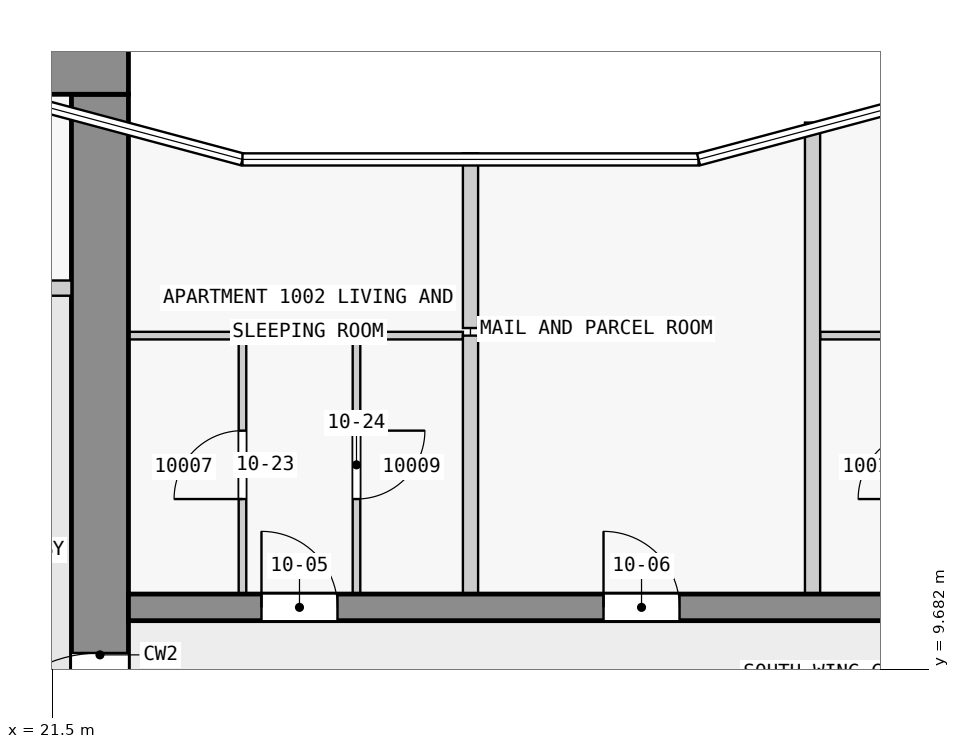
"""IFC4 building model, lengths in metres.
Left out: names, types, materials, properties, quantities, classifications, styles, units other than length and angle.
Written with IfcOpenShell. Run it as: python <this file> out.ifc"""

import sys

from ifc_helpers import new_model, si_unit, direction, frame, frame_2d, origin, place, context, subcontext, project, spatial, rectangle, extrude, element, fill, save


model = new_model("IFC4")
c1 = context("Model", 3, precision=1e-05, world=origin(), true_north=direction((0.0, 1.0)))
c2 = subcontext(c1, "Body", "Model", "MODEL_VIEW")
j1 = project(units=[si_unit("LENGTHUNIT", "METRE"), si_unit("PLANEANGLEUNIT", "RADIAN")], contexts=[c1])
p1 = place(None, origin())
s1 = spatial("IfcSite", under=j1, at=p1, CompositionType="ELEMENT")
p2 = place(p1, origin())
s2 = spatial("IfcBuilding", under=s1, at=p2, CompositionType="ELEMENT")
p3 = place(p2, frame((0.0, 0.0, 44.3)))
s3 = spatial("IfcBuildingStorey", under=s2, at=p3, CompositionType="ELEMENT", Elevation=44.3)
p4 = place(p3, frame((1.55, 17.625, 0.0), z_axis=(0.0, 0.0, 1.0), x_axis=(1.0, 0.0, 0.0)))
e1 = element("IfcWall", 1, at=p4, inside=s3, PredefinedType="SHEAR", context=c2, shape_type="SweptSolid", body=[
    extrude(rectangle(XDim=20.95, YDim=0.75, at=frame_2d((10.475, 0.0))), origin(), (0.0, 0.0, 1.0), 3.25),
])
p5 = place(p4, frame((6.55, 0.0, 0.0)))
e2 = element("IfcOpeningElement", 2, at=p5, cuts=e1, PredefinedType="OPENING", context=c2, shape_type="SweptSolid", body=[
    extrude(rectangle(XDim=1.8, YDim=2.1, at=frame_2d((0.9, 1.05))), frame((0.0, 0.385, 0.0), z_axis=(0.0, -1.0, 0.0), x_axis=(1.0, 0.0, 0.0)), (0.0, 0.0, 1.0), 0.77),
])
p6 = place(p3, frame((22.125, 2.5, 0.0), z_axis=(0.0, 0.0, 1.0), x_axis=(0.0, 1.0, 0.0)))
e3 = element("IfcWall", 3, at=p6, inside=s3, PredefinedType="SHEAR", context=c2, shape_type="SweptSolid", body=[
    extrude(rectangle(XDim=14.75, YDim=0.75, at=frame_2d((7.375, 0.0))), origin(), (0.0, 0.0, 1.0), 3.25),
])
p7 = place(p6, frame((5.6, 0.0, 0.0)))
e4 = element("IfcOpeningElement", 4, at=p7, cuts=e3, PredefinedType="OPENING", context=c2, shape_type="SweptSolid", body=[
    extrude(rectangle(XDim=1.8, YDim=2.1, at=frame_2d((0.9, 1.05))), frame((0.0, 0.385, 0.0), z_axis=(0.0, -1.0, 0.0), x_axis=(1.0, 0.0, 0.0)), (0.0, 0.0, 1.0), 0.77),
])
p8 = place(p3, frame((22.5, 10.5, 0.0), z_axis=(0.0, 0.0, 1.0), x_axis=(1.0, 0.0, 0.0)))
e5 = element("IfcWall", 5, at=p8, inside=s3, PredefinedType="SHEAR", context=c2, shape_type="SweptSolid", body=[
    extrude(rectangle(XDim=22.5, YDim=0.35, at=frame_2d((11.25, 0.0))), origin(), (0.0, 0.0, 1.0), 3.25),
])
p9 = place(p8, frame((1.75, 0.0, 0.0)))
e6 = element("IfcOpeningElement", 6, at=p9, cuts=e5, PredefinedType="OPENING", context=c2, shape_type="SweptSolid", body=[
    extrude(rectangle(XDim=1.0, YDim=2.1, at=frame_2d((0.5, 1.05))), frame((0.0, 0.185, 0.0), z_axis=(0.0, -1.0, 0.0), x_axis=(1.0, 0.0, 0.0)), (0.0, 0.0, 1.0), 0.37),
])
p10 = place(p8, frame((6.25, 0.0, 0.0)))
e7 = element("IfcOpeningElement", 7, at=p10, cuts=e5, PredefinedType="OPENING", context=c2, shape_type="SweptSolid", body=[
    extrude(rectangle(XDim=1.0, YDim=2.1, at=frame_2d((0.5, 1.05))), frame((0.0, 0.185, 0.0), z_axis=(0.0, -1.0, 0.0), x_axis=(1.0, 0.0, 0.0)), (0.0, 0.0, 1.0), 0.37),
])
p11 = place(p8, frame((10.75, 0.0, 0.0)))
e8 = element("IfcOpeningElement", 8, at=p11, cuts=e5, PredefinedType="OPENING", context=c2, shape_type="SweptSolid", body=[
    extrude(rectangle(XDim=1.0, YDim=2.1, at=frame_2d((0.5, 1.05))), frame((0.0, 0.185, 0.0), z_axis=(0.0, -1.0, 0.0), x_axis=(1.0, 0.0, 0.0)), (0.0, 0.0, 1.0), 0.37),
])
p12 = place(p8, frame((16.85, 0.0, 0.0)))
e9 = element("IfcOpeningElement", 9, at=p12, cuts=e5, PredefinedType="OPENING", context=c2, shape_type="SweptSolid", body=[
    extrude(rectangle(XDim=1.0, YDim=2.1, at=frame_2d((0.5, 1.05))), frame((0.0, 0.185, 0.0), z_axis=(0.0, -1.0, 0.0), x_axis=(1.0, 0.0, 0.0)), (0.0, 0.0, 1.0), 0.37),
])
p13 = place(p3, frame((18.6, 14.7, 0.0), z_axis=(0.0, 0.0, 1.0), x_axis=(1.0, 0.0, 0.0)))
e10 = element("IfcWall", 10, at=p13, inside=s3, PredefinedType="PARTITIONING", context=c2, shape_type="SweptSolid", body=[
    extrude(rectangle(XDim=3.15, YDim=0.2, at=frame_2d((1.575, 0.0))), origin(), (0.0, 0.0, 1.0), 3.25),
])
p14 = place(p13, frame((0.15, 0.0, 0.0)))
e11 = element("IfcOpeningElement", 11, at=p14, cuts=e10, PredefinedType="OPENING", context=c2, shape_type="SweptSolid", body=[
    extrude(rectangle(XDim=0.9, YDim=2.1, at=frame_2d((0.45, 1.05))), frame((0.0, 0.11, 0.0), z_axis=(0.0, -1.0, 0.0), x_axis=(1.0, 0.0, 0.0)), (0.0, 0.0, 1.0), 0.22),
])
p15 = place(p13, frame((1.725, 0.0, 0.0)))
e12 = element("IfcOpeningElement", 12, at=p15, cuts=e10, PredefinedType="OPENING", context=c2, shape_type="SweptSolid", body=[
    extrude(rectangle(XDim=0.9, YDim=2.1, at=frame_2d((0.45, 1.05))), frame((0.0, 0.11, 0.0), z_axis=(0.0, -1.0, 0.0), x_axis=(1.0, 0.0, 0.0)), (0.0, 0.0, 1.0), 0.22),
])
p16 = place(p3, frame((23.95, 14.075, 0.0), z_axis=(0.0, 0.0, 1.0), x_axis=(-1.0, 0.0, 0.0)))
e13 = element("IfcWall", 13, at=p16, inside=s3, PredefinedType="PARTITIONING", context=c2, shape_type="SweptSolid", body=[
    extrude(rectangle(XDim=1.45, YDim=0.1, at=frame_2d((0.725, 0.0))), origin(), (0.0, 0.0, 1.0), 3.25),
])
for number, where, z_axis, x_axis in (
    (14, (26.9, 14.075, 0.0), (0.0, 0.0, 1.0), (-1.0, 0.0, 0.0)),
    (15, (32.95, 14.075, 0.0), (0.0, 0.0, 1.0), (-1.0, 0.0, 0.0)),
):
    element("IfcWall", number, at=place(p3, frame(where, z_axis=z_axis, x_axis=x_axis)), inside=s3, PredefinedType="PARTITIONING", context=c2, shape_type="SweptSolid", body=[
        extrude(rectangle(XDim=1.35, YDim=0.1, at=frame_2d((0.675, 0.0))), origin(), (0.0, 0.0, 1.0), 3.25),
    ])
p17 = place(p3, frame((24.0, 10.675, 0.0), z_axis=(0.0, 0.0, 1.0), x_axis=(0.0, 1.0, 0.0)))
e16 = element("IfcWall", 16, at=p17, inside=s3, PredefinedType="PARTITIONING", context=c2, shape_type="SweptSolid", body=[
    extrude(rectangle(XDim=3.4, YDim=0.1, at=frame_2d((1.7, 0.0))), origin(), (0.0, 0.0, 1.0), 3.25),
])
p18 = place(p17, frame((1.25, 0.0, 0.0)))
e17 = element("IfcOpeningElement", 17, at=p18, cuts=e16, PredefinedType="OPENING", context=c2, shape_type="SweptSolid", body=[
    extrude(rectangle(XDim=0.9, YDim=2.1, at=frame_2d((0.45, 1.05))), frame((0.0, 0.06, 0.0), z_axis=(0.0, -1.0, 0.0), x_axis=(1.0, 0.0, 0.0)), (0.0, 0.0, 1.0), 0.12),
])
p19 = place(p3, frame((25.5, 14.075, 0.0), z_axis=(0.0, 0.0, 1.0), x_axis=(0.0, -1.0, 0.0)))
e18 = element("IfcWall", 18, at=p19, inside=s3, PredefinedType="PARTITIONING", context=c2, shape_type="SweptSolid", body=[
    extrude(rectangle(XDim=3.4, YDim=0.1, at=frame_2d((1.7, 0.0))), origin(), (0.0, 0.0, 1.0), 3.25),
])
p20 = place(p19, frame((1.25, 0.0, 0.0)))
e19 = element("IfcOpeningElement", 19, at=p20, cuts=e18, PredefinedType="OPENING", context=c2, shape_type="SweptSolid", body=[
    extrude(rectangle(XDim=0.9, YDim=2.1, at=frame_2d((0.45, 1.05))), frame((0.0, 0.06, 0.0), z_axis=(0.0, -1.0, 0.0), x_axis=(1.0, 0.0, 0.0)), (0.0, 0.0, 1.0), 0.12),
])
p21 = place(p3, frame((27.0, 16.473, 0.0), z_axis=(0.0, 0.0, 1.0), x_axis=(0.0, -1.0, 0.0)))
e20 = element("IfcWall", 20, at=p21, inside=s3, PredefinedType="PARTITIONING", context=c2, shape_type="SweptSolid", body=[
    extrude(rectangle(XDim=2.298, YDim=0.2, at=frame_2d((1.149, 0.0))), origin(), (0.0, 0.0, 1.0), 3.25),
])
p22 = place(p3, frame((27.0, 10.675, 0.0), z_axis=(0.0, 0.0, 1.0), x_axis=(0.0, 1.0, 0.0)))
e21 = element("IfcWall", 21, at=p22, inside=s3, PredefinedType="PARTITIONING", context=c2, shape_type="SweptSolid", body=[
    extrude(rectangle(XDim=3.4, YDim=0.2, at=frame_2d((1.7, 0.0))), origin(), (0.0, 0.0, 1.0), 3.25),
])
p23 = place(p3, frame((31.5, 10.675, 0.0), z_axis=(0.0, 0.0, 1.0), x_axis=(0.0, 1.0, 0.0)))
e22 = element("IfcWall", 22, at=p23, inside=s3, PredefinedType="PARTITIONING", context=c2, shape_type="SweptSolid", body=[
    extrude(rectangle(XDim=6.203, YDim=0.2, at=frame_2d((3.101, 0.0))), origin(), (0.0, 0.0, 1.0), 3.25),
])
p24 = place(p7, origin())
e23 = element("IfcDoor", 23, at=p24, inside=s3, OperationType="DOUBLE_DOOR_SINGLE_SWING", PredefinedType="DOOR", context=c2, shape_type="SweptSolid", body=[
    extrude(rectangle(XDim=1.8, YDim=2.1, at=frame_2d((0.9, 1.05))), frame((0.0, 0.025, 0.0), z_axis=(0.0, -1.0, 0.0), x_axis=(1.0, 0.0, 0.0)), (0.0, 0.0, 1.0), 0.05),
])
fill(e4, e23)
p25 = place(p9, origin())
e24 = element("IfcDoor", 24, at=p25, inside=s3, OperationType="SINGLE_SWING_LEFT", PredefinedType="DOOR", context=c2, shape_type="SweptSolid", body=[
    extrude(rectangle(XDim=1.0, YDim=2.1, at=frame_2d((0.5, 1.05))), frame((0.0, 0.025, 0.0), z_axis=(0.0, -1.0, 0.0), x_axis=(1.0, 0.0, 0.0)), (0.0, 0.0, 1.0), 0.05),
])
fill(e6, e24)
p26 = place(p10, origin())
e25 = element("IfcDoor", 25, at=p26, inside=s3, OperationType="SINGLE_SWING_LEFT", PredefinedType="DOOR", context=c2, shape_type="SweptSolid", body=[
    extrude(rectangle(XDim=1.0, YDim=2.1, at=frame_2d((0.5, 1.05))), frame((0.0, 0.025, 0.0), z_axis=(0.0, -1.0, 0.0), x_axis=(1.0, 0.0, 0.0)), (0.0, 0.0, 1.0), 0.05),
])
fill(e7, e25)
p27 = place(p18, origin())
e26 = element("IfcDoor", 26, at=p27, inside=s3, OperationType="SINGLE_SWING_RIGHT", PredefinedType="DOOR", context=c2, shape_type="SweptSolid", body=[
    extrude(rectangle(XDim=0.9, YDim=2.1, at=frame_2d((0.45, 1.05))), frame((0.0, 0.025, 0.0), z_axis=(0.0, -1.0, 0.0), x_axis=(1.0, 0.0, 0.0)), (0.0, 0.0, 1.0), 0.05),
])
fill(e17, e26)
p28 = place(p20, origin())
e27 = element("IfcDoor", 27, at=p28, inside=s3, OperationType="SINGLE_SWING_RIGHT", PredefinedType="DOOR", context=c2, shape_type="SweptSolid", body=[
    extrude(rectangle(XDim=0.9, YDim=2.1, at=frame_2d((0.45, 1.05))), frame((0.0, 0.025, 0.0), z_axis=(0.0, -1.0, 0.0), x_axis=(1.0, 0.0, 0.0)), (0.0, 0.0, 1.0), 0.05),
])
fill(e19, e27)
save(model, sys.argv[1])
